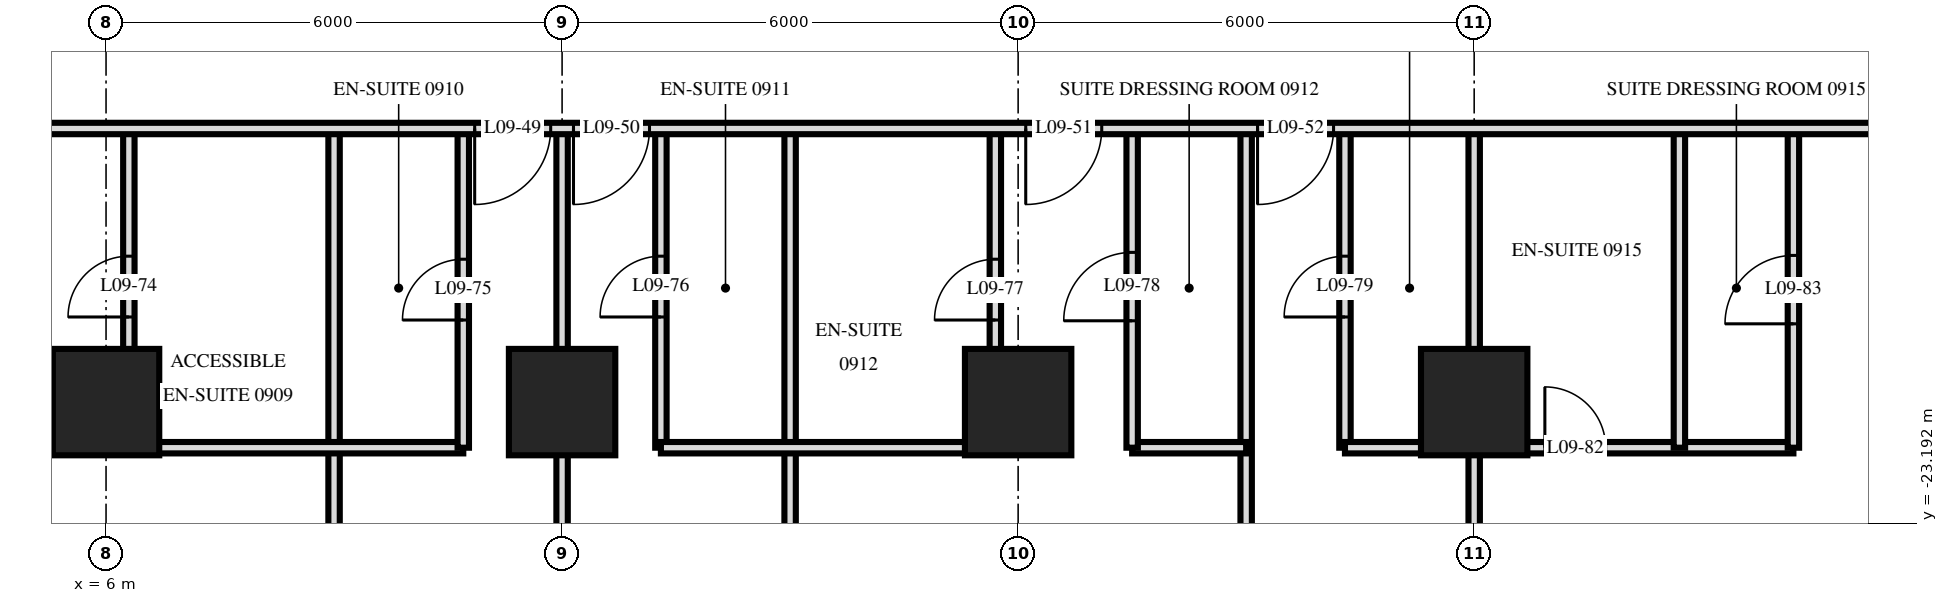
"""IFC4 building model, lengths in metres.
Left out: names, types, materials, properties, quantities, classifications, styles, units other than length and angle.
Written with IfcOpenShell. Run it as: python <this file> out.ifc"""

import sys

from ifc_helpers import new_model, si_unit, direction, frame, frame_2d, origin, origin_2d, place, context, subcontext, project, spatial, rectangle, extrude, element, fill, save


model = new_model("IFC4")
c1 = context("Model", 3, precision=1e-05, world=origin(), true_north=direction((0.0, 1.0)))
c2 = subcontext(c1, "Body", "Model", "MODEL_VIEW")
j1 = project(units=[si_unit("LENGTHUNIT", "METRE"), si_unit("PLANEANGLEUNIT", "RADIAN")], contexts=[c1])
p1 = place(None, origin())
s1 = spatial("IfcSite", under=j1, at=p1, CompositionType="ELEMENT")
p2 = place(p1, origin())
s2 = spatial("IfcBuilding", under=s1, at=p2, CompositionType="ELEMENT")
p3 = place(p2, frame((0.0, 0.0, 42.0)))
s3 = spatial("IfcBuildingStorey", under=s2, at=p3, CompositionType="ELEMENT", Elevation=42.0)
for number, where, z_axis, x_axis in (
    (1, (6.0, -21.6, 0.0), (0.0, 0.0, 1.0), (1.0, 0.0, 0.0)),
    (2, (12.0, -21.6, 0.0), (0.0, 0.0, 1.0), (1.0, 0.0, 0.0)),
    (3, (18.0, -21.6, 0.0), (0.0, 0.0, 1.0), (1.0, 0.0, 0.0)),
    (4, (24.0, -21.6, 0.0), (0.0, 0.0, 1.0), (1.0, 0.0, 0.0)),
):
    element("IfcColumn", number, at=place(p3, frame(where, z_axis=z_axis, x_axis=x_axis)), inside=s3, PredefinedType="COLUMN", context=c2, shape_type="SweptSolid", body=[
        extrude(rectangle(XDim=1.4, YDim=1.4, at=origin_2d()), origin(), (0.0, 0.0, 1.0), 3.6),
    ])
p4 = place(p3, frame((28.2, -22.2, 0.0), z_axis=(0.0, 0.0, 1.0), x_axis=(0.0, 1.0, 0.0)))
e5 = element("IfcWall", 5, at=p4, inside=s3, PredefinedType="PARTITIONING", context=c2, shape_type="SweptSolid", body=[
    extrude(rectangle(XDim=4.2, YDim=0.15, at=frame_2d((2.1, 0.0))), origin(), (0.0, 0.0, 1.0), 3.32),
])
p5 = place(p4, frame((1.63, 0.0, 0.0)))
e6 = element("IfcOpeningElement", 6, at=p5, cuts=e5, PredefinedType="OPENING", context=c2, shape_type="SweptSolid", body=[
    extrude(rectangle(XDim=0.9, YDim=2.1, at=frame_2d((0.45, 1.05))), frame((0.0, 0.085, 0.0), z_axis=(0.0, -1.0, 0.0), x_axis=(1.0, 0.0, 0.0)), (0.0, 0.0, 1.0), 0.17),
])
p6 = place(p3, frame((26.7, -22.2, 0.0), z_axis=(0.0, 0.0, 1.0), x_axis=(0.0, 1.0, 0.0)))
e7 = element("IfcWall", 7, at=p6, inside=s3, PredefinedType="PARTITIONING", context=c2, shape_type="SweptSolid", body=[
    extrude(rectangle(XDim=4.2, YDim=0.15, at=frame_2d((2.1, 0.0))), origin(), (0.0, 0.0, 1.0), 3.32),
])
p7 = place(p3, frame((24.0, -29.22, 0.0), z_axis=(0.0, 0.0, 1.0), x_axis=(0.0, 1.0, 0.0)))
e8 = element("IfcWall", 8, at=p7, inside=s3, PredefinedType="PARTITIONING", context=c2, shape_type="SweptSolid", body=[
    extrude(rectangle(XDim=11.22, YDim=0.15, at=frame_2d((5.61, 0.0))), origin(), (0.0, 0.0, 1.0), 3.32),
])
p8 = place(p3, frame((22.3, -22.2, 0.0), z_axis=(0.0, 0.0, 1.0), x_axis=(0.0, 1.0, 0.0)))
e9 = element("IfcWall", 9, at=p8, inside=s3, PredefinedType="PARTITIONING", context=c2, shape_type="SweptSolid", body=[
    extrude(rectangle(XDim=4.2, YDim=0.15, at=frame_2d((2.1, 0.0))), origin(), (0.0, 0.0, 1.0), 3.32),
])
p9 = place(p8, frame((1.72, 0.0, 0.0)))
e10 = element("IfcOpeningElement", 10, at=p9, cuts=e9, PredefinedType="OPENING", context=c2, shape_type="SweptSolid", body=[
    extrude(rectangle(XDim=0.8, YDim=2.1, at=frame_2d((0.4, 1.05))), frame((0.0, 0.085, 0.0), z_axis=(0.0, -1.0, 0.0), x_axis=(1.0, 0.0, 0.0)), (0.0, 0.0, 1.0), 0.17),
])
p10 = place(p3, frame((21.0, -29.22, 0.0), z_axis=(0.0, 0.0, 1.0), x_axis=(0.0, 1.0, 0.0)))
e11 = element("IfcWall", 11, at=p10, inside=s3, PredefinedType="PARTITIONING", context=c2, shape_type="SweptSolid", body=[
    extrude(rectangle(XDim=11.22, YDim=0.15, at=frame_2d((5.61, 0.0))), origin(), (0.0, 0.0, 1.0), 3.32),
])
p11 = place(p3, frame((19.5, -22.2, 0.0), z_axis=(0.0, 0.0, 1.0), x_axis=(0.0, 1.0, 0.0)))
e12 = element("IfcWall", 12, at=p11, inside=s3, PredefinedType="PARTITIONING", context=c2, shape_type="SweptSolid", body=[
    extrude(rectangle(XDim=4.2, YDim=0.15, at=frame_2d((2.1, 0.0))), origin(), (0.0, 0.0, 1.0), 3.32),
])
p12 = place(p11, frame((1.67, 0.0, 0.0)))
e13 = element("IfcOpeningElement", 13, at=p12, cuts=e12, PredefinedType="OPENING", context=c2, shape_type="SweptSolid", body=[
    extrude(rectangle(XDim=0.9, YDim=2.1, at=frame_2d((0.45, 1.05))), frame((0.0, 0.085, 0.0), z_axis=(0.0, -1.0, 0.0), x_axis=(1.0, 0.0, 0.0)), (0.0, 0.0, 1.0), 0.17),
])
p13 = place(p3, frame((17.7, -22.2, 0.0), z_axis=(0.0, 0.0, 1.0), x_axis=(0.0, 1.0, 0.0)))
e14 = element("IfcWall", 14, at=p13, inside=s3, PredefinedType="PARTITIONING", context=c2, shape_type="SweptSolid", body=[
    extrude(rectangle(XDim=4.2, YDim=0.15, at=frame_2d((2.1, 0.0))), origin(), (0.0, 0.0, 1.0), 3.32),
])
p14 = place(p13, frame((1.68, 0.0, 0.0)))
e15 = element("IfcOpeningElement", 15, at=p14, cuts=e14, PredefinedType="OPENING", context=c2, shape_type="SweptSolid", body=[
    extrude(rectangle(XDim=0.8, YDim=2.1, at=frame_2d((0.4, 1.05))), frame((0.0, 0.085, 0.0), z_axis=(0.0, -1.0, 0.0), x_axis=(1.0, 0.0, 0.0)), (0.0, 0.0, 1.0), 0.17),
])
p15 = place(p3, frame((15.0, -29.22, 0.0), z_axis=(0.0, 0.0, 1.0), x_axis=(0.0, 1.0, 0.0)))
e16 = element("IfcWall", 16, at=p15, inside=s3, PredefinedType="PARTITIONING", context=c2, shape_type="SweptSolid", body=[
    extrude(rectangle(XDim=11.22, YDim=0.15, at=frame_2d((5.61, 0.0))), origin(), (0.0, 0.0, 1.0), 3.32),
])
p16 = place(p3, frame((13.3, -22.2, 0.0), z_axis=(0.0, 0.0, 1.0), x_axis=(0.0, 1.0, 0.0)))
e17 = element("IfcWall", 17, at=p16, inside=s3, PredefinedType="PARTITIONING", context=c2, shape_type="SweptSolid", body=[
    extrude(rectangle(XDim=4.2, YDim=0.15, at=frame_2d((2.1, 0.0))), origin(), (0.0, 0.0, 1.0), 3.32),
])
p17 = place(p16, frame((1.72, 0.0, 0.0)))
e18 = element("IfcOpeningElement", 18, at=p17, cuts=e17, PredefinedType="OPENING", context=c2, shape_type="SweptSolid", body=[
    extrude(rectangle(XDim=0.8, YDim=2.1, at=frame_2d((0.4, 1.05))), frame((0.0, 0.085, 0.0), z_axis=(0.0, -1.0, 0.0), x_axis=(1.0, 0.0, 0.0)), (0.0, 0.0, 1.0), 0.17),
])
p18 = place(p3, frame((12.0, -29.22, 0.0), z_axis=(0.0, 0.0, 1.0), x_axis=(0.0, 1.0, 0.0)))
e19 = element("IfcWall", 19, at=p18, inside=s3, PredefinedType="PARTITIONING", context=c2, shape_type="SweptSolid", body=[
    extrude(rectangle(XDim=11.22, YDim=0.15, at=frame_2d((5.61, 0.0))), origin(), (0.0, 0.0, 1.0), 3.32),
])
p19 = place(p3, frame((10.7, -22.2, 0.0), z_axis=(0.0, 0.0, 1.0), x_axis=(0.0, 1.0, 0.0)))
e20 = element("IfcWall", 20, at=p19, inside=s3, PredefinedType="PARTITIONING", context=c2, shape_type="SweptSolid", body=[
    extrude(rectangle(XDim=4.2, YDim=0.15, at=frame_2d((2.1, 0.0))), origin(), (0.0, 0.0, 1.0), 3.32),
])
p20 = place(p19, frame((1.68, 0.0, 0.0)))
e21 = element("IfcOpeningElement", 21, at=p20, cuts=e20, PredefinedType="OPENING", context=c2, shape_type="SweptSolid", body=[
    extrude(rectangle(XDim=0.8, YDim=2.1, at=frame_2d((0.4, 1.05))), frame((0.0, 0.085, 0.0), z_axis=(0.0, -1.0, 0.0), x_axis=(1.0, 0.0, 0.0)), (0.0, 0.0, 1.0), 0.17),
])
p21 = place(p3, frame((9.0, -29.22, 0.0), z_axis=(0.0, 0.0, 1.0), x_axis=(0.0, 1.0, 0.0)))
e22 = element("IfcWall", 22, at=p21, inside=s3, PredefinedType="PARTITIONING", context=c2, shape_type="SweptSolid", body=[
    extrude(rectangle(XDim=11.22, YDim=0.15, at=frame_2d((5.61, 0.0))), origin(), (0.0, 0.0, 1.0), 3.32),
])
p22 = place(p3, frame((6.3, -22.2, 0.0), z_axis=(0.0, 0.0, 1.0), x_axis=(0.0, 1.0, 0.0)))
e23 = element("IfcWall", 23, at=p22, inside=s3, PredefinedType="PARTITIONING", context=c2, shape_type="SweptSolid", body=[
    extrude(rectangle(XDim=4.2, YDim=0.15, at=frame_2d((2.1, 0.0))), origin(), (0.0, 0.0, 1.0), 3.32),
])
p23 = place(p22, frame((1.72, 0.0, 0.0)))
e24 = element("IfcOpeningElement", 24, at=p23, cuts=e23, PredefinedType="OPENING", context=c2, shape_type="SweptSolid", body=[
    extrude(rectangle(XDim=0.8, YDim=2.1, at=frame_2d((0.4, 1.05))), frame((0.0, 0.085, 0.0), z_axis=(0.0, -1.0, 0.0), x_axis=(1.0, 0.0, 0.0)), (0.0, 0.0, 1.0), 0.17),
])
for number, where, z_axis, x_axis in (
    (25, (6.3, -22.2, 0.0), (0.0, 0.0, 1.0), (1.0, 0.0, 0.0)),
    (26, (13.3, -22.2, 0.0), (0.0, 0.0, 1.0), (1.0, 0.0, 0.0)),
):
    element("IfcWall", number, at=place(p3, frame(where, z_axis=z_axis, x_axis=x_axis)), inside=s3, PredefinedType="PARTITIONING", context=c2, shape_type="SweptSolid", body=[
        extrude(rectangle(XDim=4.4, YDim=0.15, at=frame_2d((2.2, 0.0))), origin(), (0.0, 0.0, 1.0), 3.32),
    ])
p24 = place(p3, frame((19.5, -22.2, 0.0), z_axis=(0.0, 0.0, 1.0), x_axis=(1.0, 0.0, 0.0)))
e27 = element("IfcWall", 27, at=p24, inside=s3, PredefinedType="PARTITIONING", context=c2, shape_type="SweptSolid", body=[
    extrude(rectangle(XDim=1.5, YDim=0.15, at=frame_2d((0.75, 0.0))), origin(), (0.0, 0.0, 1.0), 3.32),
])
p25 = place(p3, frame((22.3, -22.2, 0.0), z_axis=(0.0, 0.0, 1.0), x_axis=(1.0, 0.0, 0.0)))
e28 = element("IfcWall", 28, at=p25, inside=s3, PredefinedType="PARTITIONING", context=c2, shape_type="SweptSolid", body=[
    extrude(rectangle(XDim=5.9, YDim=0.15, at=frame_2d((2.95, 0.0))), origin(), (0.0, 0.0, 1.0), 3.32),
])
p26 = place(p25, frame((2.63, 0.0, 0.0)))
e29 = element("IfcOpeningElement", 29, at=p26, cuts=e28, PredefinedType="OPENING", context=c2, shape_type="SweptSolid", body=[
    extrude(rectangle(XDim=0.8, YDim=2.1, at=frame_2d((0.4, 1.05))), frame((0.0, 0.085, 0.0), z_axis=(0.0, -1.0, 0.0), x_axis=(1.0, 0.0, 0.0)), (0.0, 0.0, 1.0), 0.17),
])
p27 = place(p3, frame((-33.12, -18.0, 0.0), z_axis=(0.0, 0.0, 1.0), x_axis=(1.0, 0.0, 0.0)))
e30 = element("IfcWall", 30, at=p27, inside=s3, PredefinedType="PARTITIONING", context=c2, shape_type="SweptSolid", body=[
    extrude(rectangle(XDim=66.24, YDim=0.15, at=frame_2d((33.12, 0.0))), origin(), (0.0, 0.0, 1.0), 3.32),
])
p28 = place(p27, frame((12.27, 0.0, 0.0)))
e31 = element("IfcOpeningElement", 31, at=p28, cuts=e30, PredefinedType="OPENING", context=c2, shape_type="SweptSolid", body=[
    extrude(rectangle(XDim=1.0, YDim=2.1, at=frame_2d((0.5, 1.05))), frame((0.0, 0.085, 0.0), z_axis=(0.0, -1.0, 0.0), x_axis=(1.0, 0.0, 0.0)), (0.0, 0.0, 1.0), 0.17),
])
p29 = place(p27, frame((16.97, 0.0, 0.0)))
e32 = element("IfcOpeningElement", 32, at=p29, cuts=e30, PredefinedType="OPENING", context=c2, shape_type="SweptSolid", body=[
    extrude(rectangle(XDim=1.0, YDim=2.1, at=frame_2d((0.5, 1.05))), frame((0.0, 0.085, 0.0), z_axis=(0.0, -1.0, 0.0), x_axis=(1.0, 0.0, 0.0)), (0.0, 0.0, 1.0), 0.17),
])
p30 = place(p27, frame((18.27, 0.0, 0.0)))
e33 = element("IfcOpeningElement", 33, at=p30, cuts=e30, PredefinedType="OPENING", context=c2, shape_type="SweptSolid", body=[
    extrude(rectangle(XDim=1.0, YDim=2.1, at=frame_2d((0.5, 1.05))), frame((0.0, 0.085, 0.0), z_axis=(0.0, -1.0, 0.0), x_axis=(1.0, 0.0, 0.0)), (0.0, 0.0, 1.0), 0.17),
])
p31 = place(p27, frame((22.97, 0.0, 0.0)))
e34 = element("IfcOpeningElement", 34, at=p31, cuts=e30, PredefinedType="OPENING", context=c2, shape_type="SweptSolid", body=[
    extrude(rectangle(XDim=1.0, YDim=2.1, at=frame_2d((0.5, 1.05))), frame((0.0, 0.085, 0.0), z_axis=(0.0, -1.0, 0.0), x_axis=(1.0, 0.0, 0.0)), (0.0, 0.0, 1.0), 0.17),
])
p32 = place(p27, frame((24.27, 0.0, 0.0)))
e35 = element("IfcOpeningElement", 35, at=p32, cuts=e30, PredefinedType="OPENING", context=c2, shape_type="SweptSolid", body=[
    extrude(rectangle(XDim=1.0, YDim=2.1, at=frame_2d((0.5, 1.05))), frame((0.0, 0.085, 0.0), z_axis=(0.0, -1.0, 0.0), x_axis=(1.0, 0.0, 0.0)), (0.0, 0.0, 1.0), 0.17),
])
p33 = place(p27, frame((28.97, 0.0, 0.0)))
e36 = element("IfcOpeningElement", 36, at=p33, cuts=e30, PredefinedType="OPENING", context=c2, shape_type="SweptSolid", body=[
    extrude(rectangle(XDim=1.0, YDim=2.1, at=frame_2d((0.5, 1.05))), frame((0.0, 0.085, 0.0), z_axis=(0.0, -1.0, 0.0), x_axis=(1.0, 0.0, 0.0)), (0.0, 0.0, 1.0), 0.17),
])
p34 = place(p27, frame((30.27, 0.0, 0.0)))
e37 = element("IfcOpeningElement", 37, at=p34, cuts=e30, PredefinedType="OPENING", context=c2, shape_type="SweptSolid", body=[
    extrude(rectangle(XDim=1.0, YDim=2.1, at=frame_2d((0.5, 1.05))), frame((0.0, 0.085, 0.0), z_axis=(0.0, -1.0, 0.0), x_axis=(1.0, 0.0, 0.0)), (0.0, 0.0, 1.0), 0.17),
])
p35 = place(p27, frame((34.97, 0.0, 0.0)))
e38 = element("IfcOpeningElement", 38, at=p35, cuts=e30, PredefinedType="OPENING", context=c2, shape_type="SweptSolid", body=[
    extrude(rectangle(XDim=1.0, YDim=2.1, at=frame_2d((0.5, 1.05))), frame((0.0, 0.085, 0.0), z_axis=(0.0, -1.0, 0.0), x_axis=(1.0, 0.0, 0.0)), (0.0, 0.0, 1.0), 0.17),
])
p36 = place(p27, frame((37.27, 0.0, 0.0)))
e39 = element("IfcOpeningElement", 39, at=p36, cuts=e30, PredefinedType="OPENING", context=c2, shape_type="SweptSolid", body=[
    extrude(rectangle(XDim=1.0, YDim=2.1, at=frame_2d((0.5, 1.05))), frame((0.0, 0.085, 0.0), z_axis=(0.0, -1.0, 0.0), x_axis=(1.0, 0.0, 0.0)), (0.0, 0.0, 1.0), 0.17),
])
p37 = place(p27, frame((43.97, 0.0, 0.0)))
e40 = element("IfcOpeningElement", 40, at=p37, cuts=e30, PredefinedType="OPENING", context=c2, shape_type="SweptSolid", body=[
    extrude(rectangle(XDim=1.0, YDim=2.1, at=frame_2d((0.5, 1.05))), frame((0.0, 0.085, 0.0), z_axis=(0.0, -1.0, 0.0), x_axis=(1.0, 0.0, 0.0)), (0.0, 0.0, 1.0), 0.17),
])
p38 = place(p27, frame((45.27, 0.0, 0.0)))
e41 = element("IfcOpeningElement", 41, at=p38, cuts=e30, PredefinedType="OPENING", context=c2, shape_type="SweptSolid", body=[
    extrude(rectangle(XDim=1.0, YDim=2.1, at=frame_2d((0.5, 1.05))), frame((0.0, 0.085, 0.0), z_axis=(0.0, -1.0, 0.0), x_axis=(1.0, 0.0, 0.0)), (0.0, 0.0, 1.0), 0.17),
])
p39 = place(p27, frame((51.22, 0.0, 0.0)))
e42 = element("IfcOpeningElement", 42, at=p39, cuts=e30, PredefinedType="OPENING", context=c2, shape_type="SweptSolid", body=[
    extrude(rectangle(XDim=1.0, YDim=2.1, at=frame_2d((0.5, 1.05))), frame((0.0, 0.085, 0.0), z_axis=(0.0, -1.0, 0.0), x_axis=(1.0, 0.0, 0.0)), (0.0, 0.0, 1.0), 0.17),
])
p40 = place(p27, frame((54.27, 0.0, 0.0)))
e43 = element("IfcOpeningElement", 43, at=p40, cuts=e30, PredefinedType="OPENING", context=c2, shape_type="SweptSolid", body=[
    extrude(rectangle(XDim=1.0, YDim=2.1, at=frame_2d((0.5, 1.05))), frame((0.0, 0.085, 0.0), z_axis=(0.0, -1.0, 0.0), x_axis=(1.0, 0.0, 0.0)), (0.0, 0.0, 1.0), 0.17),
])
p41 = place(p27, frame((6.07, 0.0, 0.0)))
e44 = element("IfcOpeningElement", 44, at=p41, cuts=e30, PredefinedType="OPENING", context=c2, shape_type="SweptSolid", body=[
    extrude(rectangle(XDim=1.0, YDim=2.1, at=frame_2d((0.5, 1.05))), frame((0.0, 0.085, 0.0), z_axis=(0.0, -1.0, 0.0), x_axis=(1.0, 0.0, 0.0)), (0.0, 0.0, 1.0), 0.17),
])
p42 = place(p27, frame((63.37, 0.0, 0.0)))
e45 = element("IfcOpeningElement", 45, at=p42, cuts=e30, PredefinedType="OPENING", context=c2, shape_type="SweptSolid", body=[
    extrude(rectangle(XDim=1.0, YDim=2.1, at=frame_2d((0.5, 1.05))), frame((0.0, 0.085, 0.0), z_axis=(0.0, -1.0, 0.0), x_axis=(1.0, 0.0, 0.0)), (0.0, 0.0, 1.0), 0.17),
])
p43 = place(p37, frame((0.5, 0.0, 0.0), z_axis=(0.0, 0.0, 1.0), x_axis=(-1.0, 0.0, 0.0)))
e46 = element("IfcDoor", 46, at=p43, inside=s3, OperationType="SINGLE_SWING_LEFT", PredefinedType="DOOR", context=c2, shape_type="SweptSolid", body=[
    extrude(rectangle(XDim=1.0, YDim=2.1, at=frame_2d((0.0, 1.05))), frame((0.0, -0.025, 0.0), z_axis=(0.0, 1.0, 0.0), x_axis=(-1.0, 0.0, 0.0)), (0.0, 0.0, 1.0), 0.05),
])
fill(e40, e46)
p44 = place(p38, frame((0.5, 0.0, 0.0), z_axis=(0.0, 0.0, 1.0), x_axis=(-1.0, 0.0, 0.0)))
e47 = element("IfcDoor", 47, at=p44, inside=s3, OperationType="SINGLE_SWING_LEFT", PredefinedType="DOOR", context=c2, shape_type="SweptSolid", body=[
    extrude(rectangle(XDim=1.0, YDim=2.1, at=frame_2d((0.0, 1.05))), frame((0.0, -0.025, 0.0), z_axis=(0.0, 1.0, 0.0), x_axis=(-1.0, 0.0, 0.0)), (0.0, 0.0, 1.0), 0.05),
])
fill(e41, e47)
p45 = place(p39, frame((0.5, 0.0, 0.0), z_axis=(0.0, 0.0, 1.0), x_axis=(-1.0, 0.0, 0.0)))
e48 = element("IfcDoor", 48, at=p45, inside=s3, OperationType="SINGLE_SWING_LEFT", PredefinedType="DOOR", context=c2, shape_type="SweptSolid", body=[
    extrude(rectangle(XDim=1.0, YDim=2.1, at=frame_2d((0.0, 1.05))), frame((0.0, -0.025, 0.0), z_axis=(0.0, 1.0, 0.0), x_axis=(-1.0, 0.0, 0.0)), (0.0, 0.0, 1.0), 0.05),
])
fill(e42, e48)
p46 = place(p40, frame((0.5, 0.0, 0.0), z_axis=(0.0, 0.0, 1.0), x_axis=(-1.0, 0.0, 0.0)))
e49 = element("IfcDoor", 49, at=p46, inside=s3, OperationType="SINGLE_SWING_LEFT", PredefinedType="DOOR", context=c2, shape_type="SweptSolid", body=[
    extrude(rectangle(XDim=1.0, YDim=2.1, at=frame_2d((0.0, 1.05))), frame((0.0, -0.025, 0.0), z_axis=(0.0, 1.0, 0.0), x_axis=(-1.0, 0.0, 0.0)), (0.0, 0.0, 1.0), 0.05),
])
fill(e43, e49)
p47 = place(p23, origin())
e50 = element("IfcDoor", 50, at=p47, inside=s3, OperationType="SINGLE_SWING_RIGHT", PredefinedType="DOOR", context=c2, shape_type="SweptSolid", body=[
    extrude(rectangle(XDim=0.8, YDim=2.1, at=frame_2d((0.4, 1.05))), frame((0.0, 0.025, 0.0), z_axis=(0.0, -1.0, 0.0), x_axis=(1.0, 0.0, 0.0)), (0.0, 0.0, 1.0), 0.05),
])
fill(e24, e50)
p48 = place(p20, origin())
e51 = element("IfcDoor", 51, at=p48, inside=s3, OperationType="SINGLE_SWING_RIGHT", PredefinedType="DOOR", context=c2, shape_type="SweptSolid", body=[
    extrude(rectangle(XDim=0.8, YDim=2.1, at=frame_2d((0.4, 1.05))), frame((0.0, 0.025, 0.0), z_axis=(0.0, -1.0, 0.0), x_axis=(1.0, 0.0, 0.0)), (0.0, 0.0, 1.0), 0.05),
])
fill(e21, e51)
p49 = place(p17, origin())
e52 = element("IfcDoor", 52, at=p49, inside=s3, OperationType="SINGLE_SWING_RIGHT", PredefinedType="DOOR", context=c2, shape_type="SweptSolid", body=[
    extrude(rectangle(XDim=0.8, YDim=2.1, at=frame_2d((0.4, 1.05))), frame((0.0, 0.025, 0.0), z_axis=(0.0, -1.0, 0.0), x_axis=(1.0, 0.0, 0.0)), (0.0, 0.0, 1.0), 0.05),
])
fill(e18, e52)
p50 = place(p14, origin())
e53 = element("IfcDoor", 53, at=p50, inside=s3, OperationType="SINGLE_SWING_RIGHT", PredefinedType="DOOR", context=c2, shape_type="SweptSolid", body=[
    extrude(rectangle(XDim=0.8, YDim=2.1, at=frame_2d((0.4, 1.05))), frame((0.0, 0.025, 0.0), z_axis=(0.0, -1.0, 0.0), x_axis=(1.0, 0.0, 0.0)), (0.0, 0.0, 1.0), 0.05),
])
fill(e15, e53)
p51 = place(p12, origin())
e54 = element("IfcDoor", 54, at=p51, inside=s3, OperationType="SINGLE_SWING_RIGHT", PredefinedType="DOOR", context=c2, shape_type="SweptSolid", body=[
    extrude(rectangle(XDim=0.9, YDim=2.1, at=frame_2d((0.45, 1.05))), frame((0.0, 0.025, 0.0), z_axis=(0.0, -1.0, 0.0), x_axis=(1.0, 0.0, 0.0)), (0.0, 0.0, 1.0), 0.05),
])
fill(e13, e54)
p52 = place(p9, origin())
e55 = element("IfcDoor", 55, at=p52, inside=s3, OperationType="SINGLE_SWING_RIGHT", PredefinedType="DOOR", context=c2, shape_type="SweptSolid", body=[
    extrude(rectangle(XDim=0.8, YDim=2.1, at=frame_2d((0.4, 1.05))), frame((0.0, 0.025, 0.0), z_axis=(0.0, -1.0, 0.0), x_axis=(1.0, 0.0, 0.0)), (0.0, 0.0, 1.0), 0.05),
])
fill(e10, e55)
p53 = place(p26, origin())
e56 = element("IfcDoor", 56, at=p53, inside=s3, OperationType="SINGLE_SWING_RIGHT", PredefinedType="DOOR", context=c2, shape_type="SweptSolid", body=[
    extrude(rectangle(XDim=0.8, YDim=2.1, at=frame_2d((0.4, 1.05))), frame((0.0, 0.025, 0.0), z_axis=(0.0, -1.0, 0.0), x_axis=(1.0, 0.0, 0.0)), (0.0, 0.0, 1.0), 0.05),
])
fill(e29, e56)
p54 = place(p5, origin())
e57 = element("IfcDoor", 57, at=p54, inside=s3, OperationType="SINGLE_SWING_RIGHT", PredefinedType="DOOR", context=c2, shape_type="SweptSolid", body=[
    extrude(rectangle(XDim=0.9, YDim=2.1, at=frame_2d((0.45, 1.05))), frame((0.0, 0.025, 0.0), z_axis=(0.0, -1.0, 0.0), x_axis=(1.0, 0.0, 0.0)), (0.0, 0.0, 1.0), 0.05),
])
fill(e6, e57)
save(model, sys.argv[1])
